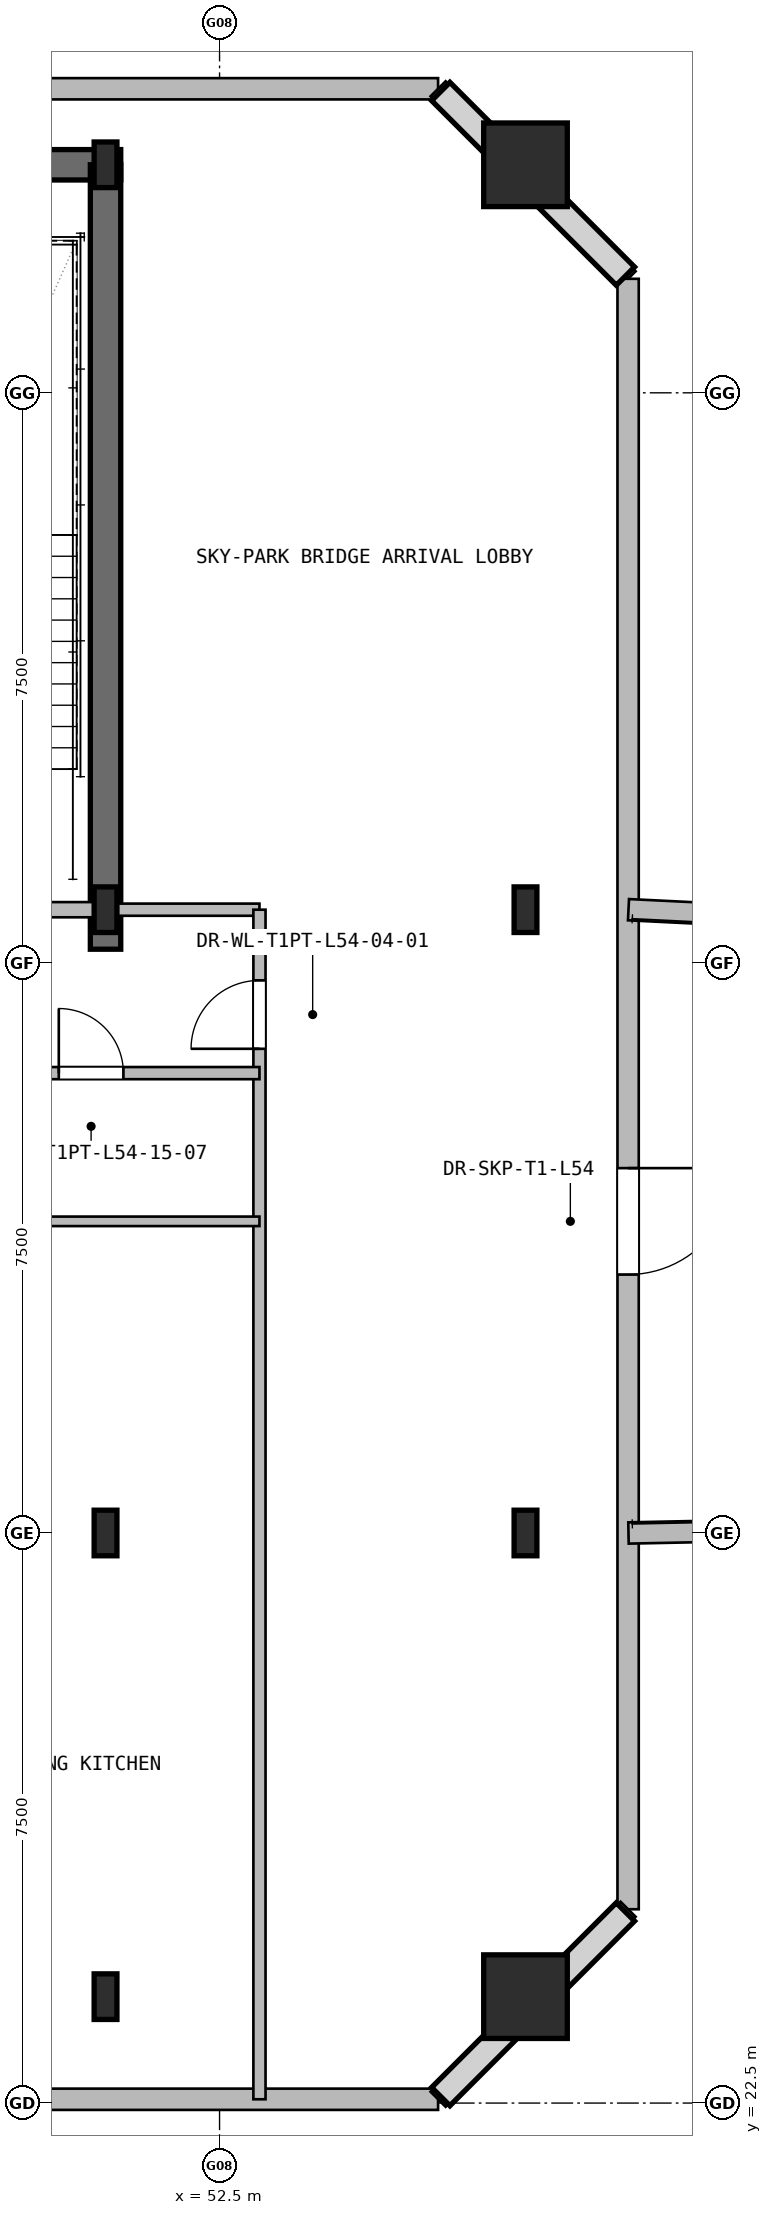
"""IFC4 building model, lengths in metres.
Left out: names, types, materials, properties, quantities, classifications, styles, units other than length and angle.
Written with IfcOpenShell. Run it as: python <this file> out.ifc"""

import sys

from ifc_helpers import new_model, si_unit, direction, frame, frame_2d, origin, origin_2d, place, context, subcontext, project, spatial, rectangle, hollow_rectangle, i_section, extrude, element, fill, save


model = new_model("IFC4")
c1 = context("Model", 3, precision=1e-05, world=origin(), true_north=direction((0.0, 1.0)))
c2 = subcontext(c1, "Body", "Model", "MODEL_VIEW")
j1 = project(units=[si_unit("LENGTHUNIT", "METRE"), si_unit("PLANEANGLEUNIT", "RADIAN")], contexts=[c1])
p1 = place(None, origin())
s1 = spatial("IfcSite", under=j1, at=p1, CompositionType="ELEMENT")
p2 = place(p1, origin())
s2 = spatial("IfcBuilding", under=s1, at=p2, CompositionType="ELEMENT")
p3 = place(p2, frame((0.0, 0.0, 197.1)))
s3 = spatial("IfcBuildingStorey", under=s2, at=p3, CompositionType="ELEMENT", Elevation=197.1)
p4 = place(p3, frame((23.8, 48.0, 0.0), z_axis=(0.0, 0.0, 1.0), x_axis=(1.0, 0.0, 0.0)))
e1 = element("IfcWall", 1, at=p4, inside=s3, PredefinedType="SHEAR", context=c2, shape_type="SweptSolid", body=[
    extrude(rectangle(XDim=27.4, YDim=0.4, at=frame_2d((13.7, 0.0))), origin(), (0.0, 0.0, 1.0), 4.2),
])
p5 = place(p3, frame((51.0, 37.68, 0.0), z_axis=(0.0, 0.0, 1.0), x_axis=(0.0, 1.0, 0.0)))
e2 = element("IfcWall", 2, at=p5, inside=s3, PredefinedType="SHEAR", context=c2, shape_type="SweptSolid", body=[
    extrude(rectangle(XDim=10.32, YDim=0.4, at=frame_2d((5.16, 0.0))), origin(), (0.0, 0.0, 1.0), 4.2),
])
for number, where, z_axis, x_axis in (
    (3, (51.0, 23.9, 0.0), (0.0, 0.0, 1.0), (1.0, 0.0, 0.0)),
    (4, (51.0, 30.0, 0.0), (0.0, 0.0, 1.0), (1.0, 0.0, 0.0)),
    (5, (51.0, 38.2, 0.0), (0.0, 0.0, 1.0), (1.0, 0.0, 0.0)),
    (6, (51.0, 48.0, 0.0), (0.0, 0.0, 1.0), (1.0, 0.0, 0.0)),
):
    element("IfcColumn", number, at=place(p3, frame(where, z_axis=z_axis, x_axis=x_axis)), inside=s3, PredefinedType="COLUMN", context=c2, shape_type="SweptSolid", body=[
        extrude(i_section(OverallWidth=0.3, OverallDepth=0.6, WebThickness=0.014, FlangeThickness=0.025, at=origin_2d()), origin(), (0.0, 0.0, 1.0), 4.2),
    ])
p6 = place(p3, frame((56.525, 23.9, 0.0), z_axis=(0.0, 0.0, 1.0), x_axis=(1.0, 0.0, 0.0)))
e7 = element("IfcColumn", 7, at=p6, inside=s3, PredefinedType="COLUMN", context=c2, shape_type="SweptSolid", body=[
    extrude(hollow_rectangle(XDim=1.1, YDim=1.1, WallThickness=0.032, at=origin_2d()), origin(), (0.0, 0.0, 1.0), 4.2),
])
for number, where, z_axis, x_axis in (
    (8, (56.525, 30.0, 0.0), (0.0, 0.0, 1.0), (1.0, 0.0, 0.0)),
    (9, (56.525, 38.2, 0.0), (0.0, 0.0, 1.0), (1.0, 0.0, 0.0)),
):
    element("IfcColumn", number, at=place(p3, frame(where, z_axis=z_axis, x_axis=x_axis)), inside=s3, PredefinedType="COLUMN", context=c2, shape_type="SweptSolid", body=[
        extrude(i_section(OverallWidth=0.3, OverallDepth=0.6, WebThickness=0.014, FlangeThickness=0.025, at=origin_2d()), origin(), (0.0, 0.0, 1.0), 4.2),
    ])
p7 = place(p3, frame((56.525, 48.0, 0.0), z_axis=(0.0, 0.0, 1.0), x_axis=(1.0, 0.0, 0.0)))
e10 = element("IfcColumn", 10, at=p7, inside=s3, PredefinedType="COLUMN", context=c2, shape_type="SweptSolid", body=[
    extrude(hollow_rectangle(XDim=1.1, YDim=1.1, WallThickness=0.032, at=origin_2d()), origin(), (0.0, 0.0, 1.0), 4.2),
])
p8 = place(p3, frame((55.375, 22.55, 0.0), z_axis=(0.0, 0.0, 1.0), x_axis=(-1.0, 0.0, 0.0)))
e11 = element("IfcWall", 11, at=p8, inside=s3, PredefinedType="SOLIDWALL", context=c2, shape_type="SweptSolid", body=[
    extrude(rectangle(XDim=35.75, YDim=0.28, at=frame_2d((17.875, 0.0))), origin(), (0.0, 0.0, 1.0), 3.88),
])
p9 = place(p8, frame((27.91, 0.0, 0.8)))
e12 = element("IfcOpeningElement", 12, at=p9, cuts=e11, PredefinedType="OPENING", context=c2, shape_type="SweptSolid", body=[
    extrude(rectangle(XDim=2.05, YDim=1.9, at=frame_2d((1.025, 0.95))), frame((0.0, 0.15, 0.0), z_axis=(0.0, -1.0, 0.0), x_axis=(1.0, 0.0, 0.0)), (0.0, 0.0, 1.0), 0.3),
])
p10 = place(p8, frame((23.06, 0.0, 0.8)))
e13 = element("IfcOpeningElement", 13, at=p10, cuts=e11, PredefinedType="OPENING", context=c2, shape_type="SweptSolid", body=[
    extrude(rectangle(XDim=2.05, YDim=1.9, at=frame_2d((1.025, 0.95))), frame((0.0, 0.15, 0.0), z_axis=(0.0, -1.0, 0.0), x_axis=(1.0, 0.0, 0.0)), (0.0, 0.0, 1.0), 0.3),
])
p11 = place(p8, frame((16.85, 0.0, 0.8)))
e14 = element("IfcOpeningElement", 14, at=p11, cuts=e11, PredefinedType="OPENING", context=c2, shape_type="SweptSolid", body=[
    extrude(rectangle(XDim=2.05, YDim=1.9, at=frame_2d((1.025, 0.95))), frame((0.0, 0.15, 0.0), z_axis=(0.0, -1.0, 0.0), x_axis=(1.0, 0.0, 0.0)), (0.0, 0.0, 1.0), 0.3),
])
p12 = place(p8, frame((10.64, 0.0, 0.8)))
e15 = element("IfcOpeningElement", 15, at=p12, cuts=e11, PredefinedType="OPENING", context=c2, shape_type="SweptSolid", body=[
    extrude(rectangle(XDim=2.05, YDim=1.9, at=frame_2d((1.025, 0.95))), frame((0.0, 0.15, 0.0), z_axis=(0.0, -1.0, 0.0), x_axis=(1.0, 0.0, 0.0)), (0.0, 0.0, 1.0), 0.3),
])
p13 = place(p8, frame((5.79, 0.0, 0.8)))
e16 = element("IfcOpeningElement", 16, at=p13, cuts=e11, PredefinedType="OPENING", context=c2, shape_type="SweptSolid", body=[
    extrude(rectangle(XDim=2.05, YDim=1.9, at=frame_2d((1.025, 0.95))), frame((0.0, 0.15, 0.0), z_axis=(0.0, -1.0, 0.0), x_axis=(1.0, 0.0, 0.0)), (0.0, 0.0, 1.0), 0.3),
])
p14 = place(p3, frame((19.625, 49.0, 0.0), z_axis=(0.0, 0.0, 1.0), x_axis=(1.0, 0.0, 0.0)))
e17 = element("IfcWall", 17, at=p14, inside=s3, PredefinedType="SOLIDWALL", context=c2, shape_type="SweptSolid", body=[
    extrude(rectangle(XDim=35.75, YDim=0.28, at=frame_2d((17.875, 0.0))), origin(), (0.0, 0.0, 1.0), 3.88),
])
p15 = place(p3, frame((55.375, 49.0, 0.0), z_axis=(0.0, 0.0, 1.0), x_axis=(0.707106781187, -0.707106781187, 0.0)))
e18 = element("IfcWall", 18, at=p15, inside=s3, PredefinedType="SOLIDWALL", context=c2, shape_type="SweptSolid", body=[
    extrude(rectangle(XDim=3.536, YDim=0.28, at=frame_2d((1.768, 0.0))), origin(), (0.0, 0.0, 1.0), 3.88),
])
p16 = place(p3, frame((57.875, 46.5, 0.0), z_axis=(0.0, 0.0, 1.0), x_axis=(0.0, -1.0, 0.0)))
e19 = element("IfcWall", 19, at=p16, inside=s3, PredefinedType="SOLIDWALL", context=c2, shape_type="SweptSolid", body=[
    extrude(rectangle(XDim=21.45, YDim=0.28, at=frame_2d((10.725, 0.0))), origin(), (0.0, 0.0, 1.0), 3.88),
])
p17 = place(p16, frame((11.7, 0.0, 0.0)))
e20 = element("IfcOpeningElement", 20, at=p17, cuts=e19, PredefinedType="OPENING", context=c2, shape_type="SweptSolid", body=[
    extrude(rectangle(XDim=1.4, YDim=2.15, at=frame_2d((0.7, 1.075))), frame((0.0, 0.15, 0.0), z_axis=(0.0, -1.0, 0.0), x_axis=(1.0, 0.0, 0.0)), (0.0, 0.0, 1.0), 0.3),
])
p18 = place(p3, frame((57.875, 25.05, 0.0), z_axis=(0.0, 0.0, 1.0), x_axis=(-0.707106781187, -0.707106781187, 0.0)))
e21 = element("IfcWall", 21, at=p18, inside=s3, PredefinedType="SOLIDWALL", context=c2, shape_type="SweptSolid", body=[
    extrude(rectangle(XDim=3.536, YDim=0.28, at=frame_2d((1.768, 0.0))), origin(), (0.0, 0.0, 1.0), 3.88),
])
p19 = place(p3, frame((57.88, 30.0, 0.0), z_axis=(0.0, 0.0, 1.0), x_axis=(0.999792624161, 0.020364397222, 0.0)))
e22 = element("IfcWall", 22, at=p19, inside=s3, PredefinedType="SOLIDWALL", context=c2, shape_type="SweptSolid", body=[
    extrude(rectangle(XDim=10.083, YDim=0.28, at=frame_2d((5.041, 0.0))), origin(), (0.0, 0.0, 1.0), 3.93),
])
p20 = place(p3, frame((57.88, 38.2, 0.0), z_axis=(0.0, 0.0, 1.0), x_axis=(0.998807569318, -0.048820482102, 0.0)))
e23 = element("IfcWall", 23, at=p20, inside=s3, PredefinedType="SOLIDWALL", context=c2, shape_type="SweptSolid", body=[
    extrude(rectangle(XDim=9.767, YDim=0.28, at=frame_2d((4.883, 0.0))), origin(), (0.0, 0.0, 1.0), 3.93),
])
p21 = place(p3, frame((47.15, 38.2, 0.0), z_axis=(0.0, 0.0, 1.0), x_axis=(1.0, 0.0, 0.0)))
e24 = element("IfcWall", 24, at=p21, inside=s3, PredefinedType="PARTITIONING", context=c2, shape_type="SweptSolid", body=[
    extrude(rectangle(XDim=3.85, YDim=0.2, at=frame_2d((1.925, 0.0))), origin(), (0.0, 0.0, 1.0), 3.28),
])
p22 = place(p21, frame((0.75, 0.0, 0.0)))
e25 = element("IfcOpeningElement", 25, at=p22, cuts=e24, PredefinedType="OPENING", context=c2, shape_type="SweptSolid", body=[
    extrude(rectangle(XDim=1.12, YDim=2.1, at=frame_2d((0.56, 1.05))), frame((0.0, 0.11, 0.0), z_axis=(0.0, -1.0, 0.0), x_axis=(1.0, 0.0, 0.0)), (0.0, 0.0, 1.0), 0.22),
])
p23 = place(p3, frame((51.0, 38.2, 0.0), z_axis=(0.0, 0.0, 1.0), x_axis=(1.0, 0.0, 0.0)))
e26 = element("IfcWall", 26, at=p23, inside=s3, PredefinedType="PARTITIONING", context=c2, shape_type="SweptSolid", body=[
    extrude(rectangle(XDim=2.025, YDim=0.16, at=frame_2d((1.012, 0.0))), origin(), (0.0, 0.0, 1.0), 3.28),
])
p24 = place(p3, frame((53.025, 22.55, 0.0), z_axis=(0.0, 0.0, 1.0), x_axis=(0.0, 1.0, 0.0)))
e27 = element("IfcWall", 27, at=p24, inside=s3, PredefinedType="PARTITIONING", context=c2, shape_type="SweptSolid", body=[
    extrude(rectangle(XDim=15.65, YDim=0.16, at=frame_2d((7.825, 0.0))), origin(), (0.0, 0.0, 1.0), 3.88),
])
p25 = place(p24, frame((13.82, 0.0, 0.0)))
e28 = element("IfcOpeningElement", 28, at=p25, cuts=e27, PredefinedType="OPENING", context=c2, shape_type="SweptSolid", body=[
    extrude(rectangle(XDim=0.9, YDim=2.05, at=frame_2d((0.45, 1.025))), frame((0.0, 0.09, 0.0), z_axis=(0.0, -1.0, 0.0), x_axis=(1.0, 0.0, 0.0)), (0.0, 0.0, 1.0), 0.18),
])
p26 = place(p3, frame((48.595, 34.1, 0.0), z_axis=(0.0, 0.0, 1.0), x_axis=(1.0, 0.0, 0.0)))
e29 = element("IfcWall", 29, at=p26, inside=s3, PredefinedType="PARTITIONING", context=c2, shape_type="SweptSolid", body=[
    extrude(rectangle(XDim=4.43, YDim=0.125, at=frame_2d((2.215, 0.0))), origin(), (0.0, 0.0, 1.0), 3.53),
])
p27 = place(p3, frame((21.975, 36.05, 0.0), z_axis=(0.0, 0.0, 1.0), x_axis=(1.0, 0.0, 0.0)))
e30 = element("IfcWall", 30, at=p27, inside=s3, PredefinedType="PARTITIONING", context=c2, shape_type="SweptSolid", body=[
    extrude(rectangle(XDim=31.05, YDim=0.16, at=frame_2d((15.525, 0.0))), origin(), (0.0, 0.0, 1.0), 3.88),
])
p28 = place(p27, frame((0.8, 0.0, 0.0)))
e31 = element("IfcOpeningElement", 31, at=p28, cuts=e30, PredefinedType="OPENING", context=c2, shape_type="SweptSolid", body=[
    extrude(rectangle(XDim=0.85, YDim=2.05, at=frame_2d((0.425, 1.025))), frame((0.0, 0.09, 0.0), z_axis=(0.0, -1.0, 0.0), x_axis=(1.0, 0.0, 0.0)), (0.0, 0.0, 1.0), 0.18),
])
p29 = place(p27, frame((3.88, 0.0, 0.0)))
e32 = element("IfcOpeningElement", 32, at=p29, cuts=e30, PredefinedType="OPENING", context=c2, shape_type="SweptSolid", body=[
    extrude(rectangle(XDim=0.9, YDim=2.05, at=frame_2d((0.45, 1.025))), frame((0.0, 0.09, 0.0), z_axis=(0.0, -1.0, 0.0), x_axis=(1.0, 0.0, 0.0)), (0.0, 0.0, 1.0), 0.18),
])
p30 = place(p27, frame((8.0, 0.0, 0.0)))
e33 = element("IfcOpeningElement", 33, at=p30, cuts=e30, PredefinedType="OPENING", context=c2, shape_type="SweptSolid", body=[
    extrude(rectangle(XDim=0.85, YDim=2.05, at=frame_2d((0.425, 1.025))), frame((0.0, 0.09, 0.0), z_axis=(0.0, -1.0, 0.0), x_axis=(1.0, 0.0, 0.0)), (0.0, 0.0, 1.0), 0.18),
])
p31 = place(p27, frame((11.08, 0.0, 0.0)))
e34 = element("IfcOpeningElement", 34, at=p31, cuts=e30, PredefinedType="OPENING", context=c2, shape_type="SweptSolid", body=[
    extrude(rectangle(XDim=0.9, YDim=2.05, at=frame_2d((0.45, 1.025))), frame((0.0, 0.09, 0.0), z_axis=(0.0, -1.0, 0.0), x_axis=(1.0, 0.0, 0.0)), (0.0, 0.0, 1.0), 0.18),
])
p32 = place(p27, frame((15.05, 0.0, 0.0)))
e35 = element("IfcOpeningElement", 35, at=p32, cuts=e30, PredefinedType="OPENING", context=c2, shape_type="SweptSolid", body=[
    extrude(rectangle(XDim=0.95, YDim=2.1, at=frame_2d((0.475, 1.05))), frame((0.0, 0.09, 0.0), z_axis=(0.0, -1.0, 0.0), x_axis=(1.0, 0.0, 0.0)), (0.0, 0.0, 1.0), 0.18),
])
p33 = place(p27, frame((21.26, 0.0, 0.0)))
e36 = element("IfcOpeningElement", 36, at=p33, cuts=e30, PredefinedType="OPENING", context=c2, shape_type="SweptSolid", body=[
    extrude(rectangle(XDim=0.95, YDim=2.1, at=frame_2d((0.475, 1.05))), frame((0.0, 0.09, 0.0), z_axis=(0.0, -1.0, 0.0), x_axis=(1.0, 0.0, 0.0)), (0.0, 0.0, 1.0), 0.18),
])
p34 = place(p27, frame((28.41, 0.0, 0.0)))
e37 = element("IfcOpeningElement", 37, at=p34, cuts=e30, PredefinedType="OPENING", context=c2, shape_type="SweptSolid", body=[
    extrude(rectangle(XDim=0.85, YDim=2.05, at=frame_2d((0.425, 1.025))), frame((0.0, 0.09, 0.0), z_axis=(0.0, -1.0, 0.0), x_axis=(1.0, 0.0, 0.0)), (0.0, 0.0, 1.0), 0.18),
])
p35 = place(p27, frame((25.28, 0.0, 0.0)))
e38 = element("IfcOpeningElement", 38, at=p35, cuts=e30, PredefinedType="OPENING", context=c2, shape_type="SweptSolid", body=[
    extrude(rectangle(XDim=0.9, YDim=2.05, at=frame_2d((0.45, 1.025))), frame((0.0, 0.09, 0.0), z_axis=(0.0, -1.0, 0.0), x_axis=(1.0, 0.0, 0.0)), (0.0, 0.0, 1.0), 0.18),
])
p36 = place(p17, origin())
e39 = element("IfcDoor", 39, at=p36, inside=s3, OperationType="SINGLE_SWING_RIGHT", PredefinedType="DOOR", context=c2, shape_type="SweptSolid", body=[
    extrude(rectangle(XDim=1.4, YDim=2.15, at=frame_2d((0.7, 1.075))), frame((0.0, 0.025, 0.0), z_axis=(0.0, -1.0, 0.0), x_axis=(1.0, 0.0, 0.0)), (0.0, 0.0, 1.0), 0.05),
])
fill(e20, e39)
p37 = place(p25, origin())
e40 = element("IfcDoor", 40, at=p37, inside=s3, OperationType="SINGLE_SWING_RIGHT", PredefinedType="DOOR", context=c2, shape_type="SweptSolid", body=[
    extrude(rectangle(XDim=0.9, YDim=2.05, at=frame_2d((0.45, 1.025))), frame((0.0, 0.025, 0.0), z_axis=(0.0, -1.0, 0.0), x_axis=(1.0, 0.0, 0.0)), (0.0, 0.0, 1.0), 0.05),
])
fill(e28, e40)
p38 = place(p34, origin())
e41 = element("IfcDoor", 41, at=p38, inside=s3, OperationType="SINGLE_SWING_LEFT", PredefinedType="DOOR", context=c2, shape_type="SweptSolid", body=[
    extrude(rectangle(XDim=0.85, YDim=2.05, at=frame_2d((0.425, 1.025))), frame((0.0, 0.025, 0.0), z_axis=(0.0, -1.0, 0.0), x_axis=(1.0, 0.0, 0.0)), (0.0, 0.0, 1.0), 0.05),
])
fill(e37, e41)
save(model, sys.argv[1])
